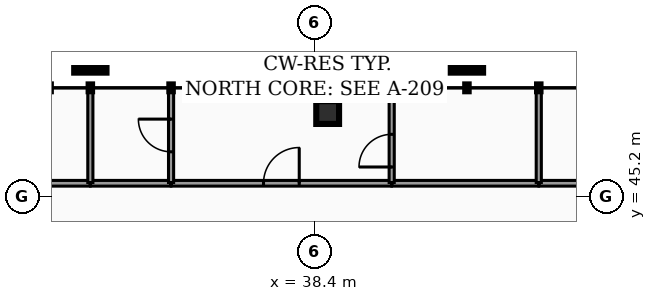
"""IFC4 building model, lengths in metres.
Left out: names, types, materials, properties, quantities, classifications, styles, units other than length and angle.
Written with IfcOpenShell. Run it as: python <this file> out.ifc"""

import sys

from ifc_helpers import new_model, si_unit, direction, frame, frame_2d, origin, origin_2d, place, context, subcontext, project, spatial, rectangle, hollow_rectangle, extrude, element, fill, save


model = new_model("IFC4")
c1 = context("Model", 3, precision=1e-05, world=origin(), true_north=direction((0.0, 1.0)))
c2 = subcontext(c1, "Body", "Model", "MODEL_VIEW")
j1 = project(units=[si_unit("LENGTHUNIT", "METRE"), si_unit("PLANEANGLEUNIT", "RADIAN")], contexts=[c1])
p1 = place(None, origin())
s1 = spatial("IfcSite", under=j1, at=p1, CompositionType="ELEMENT")
p2 = place(p1, origin())
s2 = spatial("IfcBuilding", under=s1, at=p2, CompositionType="ELEMENT")
p3 = place(p2, frame((0.0, 0.0, 239.36)))
s3 = spatial("IfcBuildingStorey", under=s2, at=p3, CompositionType="ELEMENT", Elevation=239.36)
p4 = place(p3, frame((38.745, 47.411, 0.0), z_axis=(0.0, 0.0, 1.0), x_axis=(1.0, 0.0, 0.0)))
e1 = element("IfcColumn", 1, at=p4, inside=s3, PredefinedType="COLUMN", context=c2, shape_type="SweptSolid", body=[
    extrude(hollow_rectangle(XDim=0.6, YDim=0.6, WallThickness=0.03, at=origin_2d()), origin(), (0.0, 0.0, 1.0), 3.18),
])
p5 = place(p3, frame((28.55, 45.55, 0.0), z_axis=(0.0, 0.0, 1.0), x_axis=(1.0, 0.0, 0.0)))
e2 = element("IfcWall", 2, at=p5, inside=s3, PredefinedType="PARTITIONING", context=c2, shape_type="SweptSolid", body=[
    extrude(rectangle(XDim=3.945, YDim=0.15, at=frame_2d((1.973, 0.0))), origin(), (0.0, 0.0, 1.0), 2.235),
])
p6 = place(p3, frame((44.305, 45.55, 0.0), z_axis=(0.0, 0.0, 1.0), x_axis=(1.0, 0.0, 0.0)))
e3 = element("IfcWall", 3, at=p6, inside=s3, PredefinedType="PARTITIONING", context=c2, shape_type="SweptSolid", body=[
    extrude(rectangle(XDim=4.045, YDim=0.15, at=frame_2d((2.022, 0.0))), origin(), (0.0, 0.0, 1.0), 2.235),
])
p7 = place(p3, frame((34.629, 45.55, 0.0), z_axis=(0.0, 0.0, 1.0), x_axis=(1.0, 0.0, 0.0)))
e4 = element("IfcWall", 4, at=p7, inside=s3, PredefinedType="PARTITIONING", context=c2, shape_type="SweptSolid", body=[
    extrude(rectangle(XDim=5.796, YDim=0.15, at=frame_2d((2.898, 0.0))), origin(), (0.0, 0.0, 1.0), 2.235),
])
p8 = place(p7, frame((2.428, 0.0, 0.0)))
e5 = element("IfcOpeningElement", 5, at=p8, cuts=e4, PredefinedType="OPENING", context=c2, shape_type="SweptSolid", body=[
    extrude(rectangle(XDim=0.94, YDim=2.05, at=frame_2d((0.47, 1.025))), frame((0.0, 0.085, 0.0), z_axis=(0.0, -1.0, 0.0), x_axis=(1.0, 0.0, 0.0)), (0.0, 0.0, 1.0), 0.17),
])
p9 = place(p3, frame((40.435, 45.55, 0.0), z_axis=(0.0, 0.0, 1.0), x_axis=(1.0, 0.0, 0.0)))
e6 = element("IfcWall", 6, at=p9, inside=s3, PredefinedType="PARTITIONING", context=c2, shape_type="SweptSolid", body=[
    extrude(rectangle(XDim=3.86, YDim=0.15, at=frame_2d((1.93, 0.0))), origin(), (0.0, 0.0, 1.0), 2.235),
])
p10 = place(p3, frame((32.505, 45.55, 0.0), z_axis=(0.0, 0.0, 1.0), x_axis=(1.0, 0.0, 0.0)))
e7 = element("IfcWall", 7, at=p10, inside=s3, PredefinedType="PARTITIONING", context=c2, shape_type="SweptSolid", body=[
    extrude(rectangle(XDim=2.114, YDim=0.15, at=frame_2d((1.057, 0.0))), origin(), (0.0, 0.0, 1.0), 2.235),
])
for number, where, z_axis, x_axis in (
    (8, (32.5, 45.57, 0.0), (0.0, 0.0, 1.0), (0.0, 1.0, 0.0)),
    (9, (44.3, 45.57, 0.0), (0.0, 0.0, 1.0), (0.0, 1.0, 0.0)),
):
    element("IfcWall", number, at=place(p3, frame(where, z_axis=z_axis, x_axis=x_axis)), inside=s3, PredefinedType="PARTITIONING", context=c2, shape_type="SweptSolid", body=[
        extrude(rectangle(XDim=2.476, YDim=0.135, at=frame_2d((1.238, 0.0))), origin(), (0.0, 0.0, 1.0), 2.235),
    ])
p11 = place(p3, frame((40.43, 45.57, 0.0), z_axis=(0.0, 0.0, 1.0), x_axis=(0.0, 1.0, 0.0)))
e10 = element("IfcWall", 10, at=p11, inside=s3, PredefinedType="PARTITIONING", context=c2, shape_type="SweptSolid", body=[
    extrude(rectangle(XDim=2.476, YDim=0.135, at=frame_2d((1.238, 0.0))), origin(), (0.0, 0.0, 1.0), 2.235),
])
p12 = place(p11, frame((0.408, 0.0, 0.0)))
e11 = element("IfcOpeningElement", 11, at=p12, cuts=e10, PredefinedType="OPENING", context=c2, shape_type="SweptSolid", body=[
    extrude(rectangle(XDim=0.86, YDim=2.05, at=frame_2d((0.43, 1.025))), frame((0.0, 0.077, 0.0), z_axis=(0.0, -1.0, 0.0), x_axis=(1.0, 0.0, 0.0)), (0.0, 0.0, 1.0), 0.155),
])
p13 = place(p3, frame((34.624, 45.57, 0.0), z_axis=(0.0, 0.0, 1.0), x_axis=(0.0, 1.0, 0.0)))
e12 = element("IfcWall", 12, at=p13, inside=s3, PredefinedType="PARTITIONING", context=c2, shape_type="SweptSolid", body=[
    extrude(rectangle(XDim=2.476, YDim=0.135, at=frame_2d((1.238, 0.0))), origin(), (0.0, 0.0, 1.0), 2.235),
])
p14 = place(p13, frame((0.808, 0.0, 0.0)))
e13 = element("IfcOpeningElement", 13, at=p14, cuts=e12, PredefinedType="OPENING", context=c2, shape_type="SweptSolid", body=[
    extrude(rectangle(XDim=0.86, YDim=2.05, at=frame_2d((0.43, 1.025))), frame((0.0, 0.077, 0.0), z_axis=(0.0, -1.0, 0.0), x_axis=(1.0, 0.0, 0.0)), (0.0, 0.0, 1.0), 0.155),
])
p15 = place(p8, origin())
e14 = element("IfcDoor", 14, at=p15, inside=s3, OperationType="SINGLE_SWING_RIGHT", PredefinedType="DOOR", context=c2, shape_type="SweptSolid", body=[
    extrude(rectangle(XDim=0.94, YDim=2.05, at=frame_2d((0.47, 1.025))), frame((0.0, 0.025, 0.0), z_axis=(0.0, -1.0, 0.0), x_axis=(1.0, 0.0, 0.0)), (0.0, 0.0, 1.0), 0.05),
])
fill(e5, e14)
p16 = place(p12, origin())
e15 = element("IfcDoor", 15, at=p16, inside=s3, OperationType="SINGLE_SWING_LEFT", PredefinedType="DOOR", context=c2, shape_type="SweptSolid", body=[
    extrude(rectangle(XDim=0.86, YDim=2.05, at=frame_2d((0.43, 1.025))), frame((0.0, 0.025, 0.0), z_axis=(0.0, -1.0, 0.0), x_axis=(1.0, 0.0, 0.0)), (0.0, 0.0, 1.0), 0.05),
])
fill(e11, e15)
p17 = place(p14, origin())
e16 = element("IfcDoor", 16, at=p17, inside=s3, OperationType="SINGLE_SWING_RIGHT", PredefinedType="DOOR", context=c2, shape_type="SweptSolid", body=[
    extrude(rectangle(XDim=0.86, YDim=2.05, at=frame_2d((0.43, 1.025))), frame((0.0, 0.025, 0.0), z_axis=(0.0, -1.0, 0.0), x_axis=(1.0, 0.0, 0.0)), (0.0, 0.0, 1.0), 0.05),
])
fill(e13, e16)
save(model, sys.argv[1])
